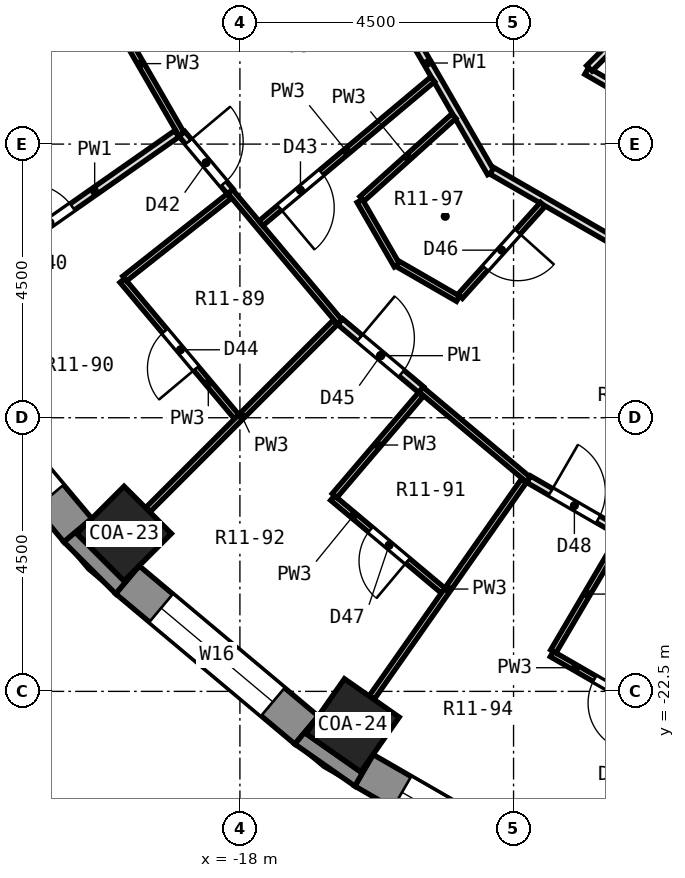
"""IFC4 building model, lengths in metres.
Left out: names, types, materials, properties, quantities, classifications, styles, units other than length and angle.
Written with IfcOpenShell. Run it as: python <this file> out.ifc"""

import sys

from ifc_helpers import new_model, si_unit, direction, frame, frame_2d, origin, origin_2d, place, context, subcontext, project, spatial, polyline, rectangle, outline, extrude, element, fill, save


model = new_model("IFC4")
c1 = context("Model", 3, precision=1e-05, world=origin(), true_north=direction((0.0, 1.0)))
c2 = subcontext(c1, "Body", "Model", "MODEL_VIEW")
j1 = project(units=[si_unit("LENGTHUNIT", "METRE"), si_unit("PLANEANGLEUNIT", "RADIAN")], contexts=[c1])
p1 = place(None, origin())
s1 = spatial("IfcSite", under=j1, at=p1, CompositionType="ELEMENT")
p2 = place(p1, origin())
s2 = spatial("IfcBuilding", under=s1, at=p2, CompositionType="ELEMENT")
p3 = place(p2, frame((0.0, 0.0, 46.1)))
s3 = spatial("IfcBuildingStorey", under=s2, at=p3, CompositionType="ELEMENT", Elevation=46.1)
for number, where, z_axis, x_axis in (
    (1, (-19.905, -19.905, 0.0), (0.0, 0.0, 1.0), (-0.707, -0.707, 0.0)),
    (2, (-16.146, -23.059, 0.0), (0.0, 0.0, 1.0), (-0.574, -0.819, 0.0)),
):
    element("IfcColumn", number, at=place(p3, frame(where, z_axis=z_axis, x_axis=x_axis)), inside=s3, PredefinedType="COLUMN", context=c2, shape_type="SweptSolid", body=[
        extrude(rectangle(XDim=1.1, YDim=1.1, at=origin_2d()), origin(), (0.0, 0.0, 1.0), 3.3),
    ])
p4 = place(p3, frame((-23.137, -16.904, 0.0), z_axis=(0.0, 0.0, 1.0), x_axis=(0.642809392687, -0.766026164483, 0.0)))
e3 = element("IfcWall", 3, at=p4, inside=s3, PredefinedType="SOLIDWALL", context=c2, shape_type="SweptSolid", body=[
    extrude(rectangle(XDim=3.846, YDim=0.6, at=frame_2d((1.923, 0.0))), origin(), (0.0, 0.0, 1.0), 2.75),
])
p5 = place(p4, frame((0.723, 0.0, 0.9)))
e4 = element("IfcOpeningElement", 4, at=p5, cuts=e3, PredefinedType="OPENING", context=c2, shape_type="SweptSolid", body=[
    extrude(rectangle(XDim=2.4, YDim=1.8, at=frame_2d((1.2, 0.9))), frame((0.0, 0.312, 0.0), z_axis=(0.0, -1.0, 0.0), x_axis=(1.0, 0.0, 0.0)), (0.0, 0.0, 1.0), 0.624),
])
p6 = place(p3, frame((-19.85, -20.665, 0.0), z_axis=(0.0, 0.0, 1.0), x_axis=(0.766026164483, -0.642809392687, 0.0)))
e5 = element("IfcWall", 5, at=p6, inside=s3, PredefinedType="SOLIDWALL", context=c2, shape_type="SweptSolid", body=[
    extrude(rectangle(XDim=3.846, YDim=0.6, at=frame_2d((1.923, 0.0))), origin(), (0.0, 0.0, 1.0), 2.75),
])
p7 = place(p6, frame((0.723, 0.0, 0.9)))
e6 = element("IfcOpeningElement", 6, at=p7, cuts=e5, PredefinedType="OPENING", context=c2, shape_type="SweptSolid", body=[
    extrude(rectangle(XDim=2.4, YDim=1.8, at=frame_2d((1.2, 0.9))), frame((0.0, 0.312, 0.0), z_axis=(0.0, -1.0, 0.0), x_axis=(1.0, 0.0, 0.0)), (0.0, 0.0, 1.0), 0.624),
])
p8 = place(p3, frame((-15.96, -23.798, 0.0), z_axis=(0.0, 0.0, 1.0), x_axis=(0.86603124159, -0.499989888488, 0.0)))
e7 = element("IfcWall", 7, at=p8, inside=s3, PredefinedType="SOLIDWALL", context=c2, shape_type="SweptSolid", body=[
    extrude(rectangle(XDim=3.846, YDim=0.6, at=frame_2d((1.923, 0.0))), origin(), (0.0, 0.0, 1.0), 2.75),
])
p9 = place(p8, frame((0.723, 0.0, 0.9)))
e8 = element("IfcOpeningElement", 8, at=p9, cuts=e7, PredefinedType="OPENING", context=c2, shape_type="SweptSolid", body=[
    extrude(rectangle(XDim=2.4, YDim=1.8, at=frame_2d((1.2, 0.9))), frame((0.0, 0.312, 0.0), z_axis=(0.0, -1.0, 0.0), x_axis=(1.0, 0.0, 0.0)), (0.0, 0.0, 1.0), 0.624),
])
p10 = place(p3, origin())
e9 = element("IfcWall", 9, at=p10, inside=s3, PredefinedType="SOLIDWALL", context=c2, shape_type="SweptSolid", body=[
    extrude(outline(polyline([(-20.043, -20.895), (-19.657, -20.435), (-19.905, -20.683), (-20.683, -19.905), (-20.435, -19.657), (-20.895, -20.043), (-20.043, -20.895)])), origin(), (0.0, 0.0, 1.0), 2.75),
])
p11 = place(p3, origin())
e10 = element("IfcWall", 10, at=p11, inside=s3, PredefinedType="SOLIDWALL", context=c2, shape_type="SweptSolid", body=[
    extrude(outline(polyline([(-17.097, -23.367), (-16.11, -24.058), (-15.81, -23.538), (-16.011, -23.825), (-16.912, -23.194), (-16.711, -22.907), (-17.097, -23.367)])), origin(), (0.0, 0.0, 1.0), 2.75),
])
p12 = place(p3, frame((-20.981, -9.838, 0.0), z_axis=(0.0, 0.0, 1.0), x_axis=(0.500011837539, -0.86601856927, 0.0)))
e11 = element("IfcWall", 11, at=p12, inside=s3, PredefinedType="PARTITIONING", context=c2, shape_type="SweptSolid", body=[
    extrude(rectangle(XDim=4.041, YDim=0.1, at=frame_2d((2.021, 0.0))), origin(), (0.0, 0.0, 1.0), 2.75),
])
p13 = place(p12, frame((1.521, 0.0, 0.0)))
e12 = element("IfcOpeningElement", 12, at=p13, cuts=e11, PredefinedType="OPENING", context=c2, shape_type="SweptSolid", body=[
    extrude(rectangle(XDim=0.9, YDim=2.1, at=frame_2d((0.45, 1.05))), frame((0.0, 0.062, 0.0), z_axis=(0.0, -1.0, 0.0), x_axis=(1.0, 0.0, 0.0)), (0.0, 0.0, 1.0), 0.124),
])
p14 = place(p3, frame((-16.03, -14.434, 0.0), z_axis=(0.0, 0.0, 1.0), x_axis=(0.499779910804, -0.866152435058, 0.0)))
e13 = element("IfcWall", 13, at=p14, inside=s3, PredefinedType="PARTITIONING", context=c2, shape_type="SweptSolid", body=[
    extrude(rectangle(XDim=1.226, YDim=0.1, at=frame_2d((0.613, 0.0))), origin(), (0.0, 0.0, 1.0), 2.75),
])
p15 = place(p3, frame((-15.957, -10.362, 0.0), z_axis=(0.0, 0.0, 1.0), x_axis=(0.500063859158, -0.865988531543, 0.0)))
e14 = element("IfcWall", 14, at=p15, inside=s3, PredefinedType="PARTITIONING", context=c2, shape_type="SweptSolid", body=[
    extrude(rectangle(XDim=4.168, YDim=0.125, at=frame_2d((2.084, 0.0))), origin(), (0.0, 0.0, 1.0), 2.75),
])
p16 = place(p15, frame((0.674, 0.0, 0.0)))
e15 = element("IfcOpeningElement", 15, at=p16, cuts=e14, PredefinedType="OPENING", context=c2, shape_type="SweptSolid", body=[
    extrude(rectangle(XDim=1.0, YDim=2.1, at=frame_2d((0.5, 1.05))), frame((0.0, 0.074, 0.0), z_axis=(0.0, -1.0, 0.0), x_axis=(1.0, 0.0, 0.0)), (0.0, 0.0, 1.0), 0.149),
])
p17 = place(p3, frame((-19.934, -15.743, 0.0), z_axis=(0.0, 0.0, 1.0), x_axis=(0.642726064959, -0.766096081064, 0.0)))
e16 = element("IfcWall", 16, at=p17, inside=s3, PredefinedType="PARTITIONING", context=c2, shape_type="SweptSolid", body=[
    extrude(rectangle(XDim=2.925, YDim=0.1, at=frame_2d((1.462, 0.0))), origin(), (0.0, 0.0, 1.0), 2.75),
])
p18 = place(p17, frame((1.087, 0.0, 0.0)))
e17 = element("IfcOpeningElement", 17, at=p18, cuts=e16, PredefinedType="OPENING", context=c2, shape_type="SweptSolid", body=[
    extrude(rectangle(XDim=0.8, YDim=2.1, at=frame_2d((0.4, 1.05))), frame((0.0, 0.062, 0.0), z_axis=(0.0, -1.0, 0.0), x_axis=(1.0, 0.0, 0.0)), (0.0, 0.0, 1.0), 0.124),
])
p19 = place(p3, frame((-18.16, -14.279, 0.0), z_axis=(0.0, 0.0, 1.0), x_axis=(0.642859397188, -0.765984200521, 0.0)))
e18 = element("IfcWall", 18, at=p19, inside=s3, PredefinedType="PARTITIONING", context=c2, shape_type="SweptSolid", body=[
    extrude(rectangle(XDim=2.806, YDim=0.1, at=frame_2d((1.403, 0.0))), origin(), (0.0, 0.0, 1.0), 2.75),
])
p20 = place(p3, frame((-18.954, -13.332, 0.0), z_axis=(0.0, 0.0, 1.0), x_axis=(0.642533660644, -0.766257459956, 0.0)))
e19 = element("IfcWall", 19, at=p20, inside=s3, PredefinedType="PARTITIONING", context=c2, shape_type="SweptSolid", body=[
    extrude(rectangle(XDim=1.235, YDim=0.125, at=frame_2d((0.618, 0.0))), origin(), (0.0, 0.0, 1.0), 2.75),
])
p21 = place(p20, frame((0.167, 0.0, 0.0)))
e20 = element("IfcOpeningElement", 20, at=p21, cuts=e19, PredefinedType="OPENING", context=c2, shape_type="SweptSolid", body=[
    extrude(rectangle(XDim=0.9, YDim=2.1, at=frame_2d((0.45, 1.05))), frame((0.0, 0.074, 0.0), z_axis=(0.0, -1.0, 0.0), x_axis=(1.0, 0.0, 0.0)), (0.0, 0.0, 1.0), 0.149),
])
p22 = place(p3, frame((-16.476, -19.319, 0.0), z_axis=(0.0, 0.0, 1.0), x_axis=(0.766109873163, -0.642709625136, 0.0)))
e21 = element("IfcWall", 21, at=p22, inside=s3, PredefinedType="PARTITIONING", context=c2, shape_type="SweptSolid", body=[
    extrude(rectangle(XDim=2.374, YDim=0.1, at=frame_2d((1.187, 0.0))), origin(), (0.0, 0.0, 1.0), 2.75),
])
p23 = place(p22, frame((0.812, 0.0, 0.0)))
e22 = element("IfcOpeningElement", 22, at=p23, cuts=e21, PredefinedType="OPENING", context=c2, shape_type="SweptSolid", body=[
    extrude(rectangle(XDim=0.8, YDim=2.1, at=frame_2d((0.4, 1.05))), frame((0.0, 0.062, 0.0), z_axis=(0.0, -1.0, 0.0), x_axis=(1.0, 0.0, 0.0)), (0.0, 0.0, 1.0), 0.124),
])
p24 = place(p3, frame((-15.021, -17.537, 0.0), z_axis=(0.0, 0.0, 1.0), x_axis=(0.766099024104, -0.642722556993, 0.0)))
e23 = element("IfcWall", 23, at=p24, inside=s3, PredefinedType="PARTITIONING", context=c2, shape_type="SweptSolid", body=[
    extrude(rectangle(XDim=2.305, YDim=0.1, at=frame_2d((1.153, 0.0))), origin(), (0.0, 0.0, 1.0), 2.75),
])
p25 = place(p3, frame((-16.351, -16.421, 0.0), z_axis=(0.0, 0.0, 1.0), x_axis=(0.765968068891, -0.642878617967, 0.0)))
e24 = element("IfcWall", 24, at=p25, inside=s3, PredefinedType="PARTITIONING", context=c2, shape_type="SweptSolid", body=[
    extrude(rectangle(XDim=1.736, YDim=0.125, at=frame_2d((0.868, 0.0))), origin(), (0.0, 0.0, 1.0), 2.75),
])
p26 = place(p25, frame((0.418, 0.0, 0.0)))
e25 = element("IfcOpeningElement", 25, at=p26, cuts=e24, PredefinedType="OPENING", context=c2, shape_type="SweptSolid", body=[
    extrude(rectangle(XDim=0.9, YDim=2.1, at=frame_2d((0.45, 1.05))), frame((0.0, 0.074, 0.0), z_axis=(0.0, -1.0, 0.0), x_axis=(1.0, 0.0, 0.0)), (0.0, 0.0, 1.0), 0.149),
])
p27 = place(p3, frame((-12.871, -21.886, 0.0), z_axis=(0.0, 0.0, 1.0), x_axis=(0.865944213836, -0.500140598757, 0.0)))
e26 = element("IfcWall", 26, at=p27, inside=s3, PredefinedType="PARTITIONING", context=c2, shape_type="SweptSolid", body=[
    extrude(rectangle(XDim=2.375, YDim=0.1, at=frame_2d((1.188, 0.0))), origin(), (0.0, 0.0, 1.0), 2.75),
])
p28 = place(p27, frame((0.812, 0.0, 0.0)))
e27 = element("IfcOpeningElement", 27, at=p28, cuts=e26, PredefinedType="OPENING", context=c2, shape_type="SweptSolid", body=[
    extrude(rectangle(XDim=0.8, YDim=2.1, at=frame_2d((0.4, 1.05))), frame((0.0, 0.062, 0.0), z_axis=(0.0, -1.0, 0.0), x_axis=(1.0, 0.0, 0.0)), (0.0, 0.0, 1.0), 0.124),
])
p29 = place(p3, frame((-13.251, -19.011, 0.0), z_axis=(0.0, 0.0, 1.0), x_axis=(0.865854192141, -0.500296430081, 0.0)))
e28 = element("IfcWall", 28, at=p29, inside=s3, PredefinedType="PARTITIONING", context=c2, shape_type="SweptSolid", body=[
    extrude(rectangle(XDim=2.16, YDim=0.125, at=frame_2d((1.08, 0.0))), origin(), (0.0, 0.0, 1.0), 2.75),
])
p30 = place(p29, frame((0.417, 0.0, 0.0)))
e29 = element("IfcOpeningElement", 29, at=p30, cuts=e28, PredefinedType="OPENING", context=c2, shape_type="SweptSolid", body=[
    extrude(rectangle(XDim=0.9, YDim=2.1, at=frame_2d((0.45, 1.05))), frame((0.0, 0.074, 0.0), z_axis=(0.0, -1.0, 0.0), x_axis=(1.0, 0.0, 0.0)), (0.0, 0.0, 1.0), 0.149),
])
p31 = place(p3, frame((-15.403, -15.471, 0.0), z_axis=(0.0, 0.0, 1.0), x_axis=(0.866117982198, -0.499839615189, 0.0)))
e30 = element("IfcWall", 30, at=p31, inside=s3, PredefinedType="PARTITIONING", context=c2, shape_type="SweptSolid", body=[
    extrude(rectangle(XDim=1.143, YDim=0.1, at=frame_2d((0.571, 0.0))), origin(), (0.0, 0.0, 1.0), 2.75),
])
p32 = place(p3, frame((-13.855, -13.94, 0.0), z_axis=(0.0, 0.0, 1.0), x_axis=(0.866024825845, -0.50000100102, 0.0)))
e31 = element("IfcWall", 31, at=p32, inside=s3, PredefinedType="PARTITIONING", context=c2, shape_type="SweptSolid", body=[
    extrude(rectangle(XDim=10.192, YDim=0.125, at=frame_2d((5.096, 0.0))), origin(), (0.0, 0.0, 1.0), 2.75),
])
p33 = place(p3, frame((-12.298, -12.298, 0.0), z_axis=(0.0, 0.0, 1.0), x_axis=(0.865982621983, -0.500074092933, 0.0)))
e32 = element("IfcWall", 32, at=p33, inside=s3, PredefinedType="PARTITIONING", context=c2, shape_type="SweptSolid", body=[
    extrude(rectangle(XDim=9.075, YDim=0.125, at=frame_2d((4.537, 0.0))), origin(), (0.0, 0.0, 1.0), 2.75),
])
p34 = place(p33, frame((3.281, 0.0, 0.0)))
e33 = element("IfcOpeningElement", 33, at=p34, cuts=e32, PredefinedType="OPENING", context=c2, shape_type="SweptSolid", body=[
    extrude(rectangle(XDim=0.9, YDim=2.1, at=frame_2d((0.45, 1.05))), frame((0.0, 0.074, 0.0), z_axis=(0.0, -1.0, 0.0), x_axis=(1.0, 0.0, 0.0)), (0.0, 0.0, 1.0), 0.149),
])
p35 = place(p3, frame((-22.601, -15.825, 0.0), z_axis=(0.0, 0.0, 1.0), x_axis=(0.819158088694, 0.57356780395, 0.0)))
e34 = element("IfcWall", 34, at=p35, inside=s3, PredefinedType="PARTITIONING", context=c2, shape_type="SweptSolid", body=[
    extrude(rectangle(XDim=4.35, YDim=0.125, at=frame_2d((2.175, 0.0))), origin(), (0.0, 0.0, 1.0), 2.75),
])
p36 = place(p35, frame((1.353, 0.0, 0.0)))
e35 = element("IfcOpeningElement", 35, at=p36, cuts=e34, PredefinedType="OPENING", context=c2, shape_type="SweptSolid", body=[
    extrude(rectangle(XDim=0.9, YDim=2.1, at=frame_2d((0.45, 1.05))), frame((0.0, 0.074, 0.0), z_axis=(0.0, -1.0, 0.0), x_axis=(1.0, 0.0, 0.0)), (0.0, 0.0, 1.0), 0.149),
])
p37 = place(p3, frame((-19.895, -15.712, 0.0), z_axis=(0.0, 0.0, 1.0), x_axis=(0.784868488399, 0.619662372521, 0.0)))
e36 = element("IfcWall", 36, at=p37, inside=s3, PredefinedType="PARTITIONING", context=c2, shape_type="SweptSolid", body=[
    extrude(rectangle(XDim=2.189, YDim=0.1, at=frame_2d((1.094, 0.0))), origin(), (0.0, 0.0, 1.0), 2.75),
])
p38 = place(p3, frame((-17.655, -14.803, 0.0), z_axis=(0.0, 0.0, 1.0), x_axis=(0.766273613589, 0.642514396039, 0.0)))
e37 = element("IfcWall", 37, at=p38, inside=s3, PredefinedType="PARTITIONING", context=c2, shape_type="SweptSolid", body=[
    extrude(rectangle(XDim=3.685, YDim=0.1, at=frame_2d((1.843, 0.0))), origin(), (0.0, 0.0, 1.0), 2.75),
])
p39 = place(p38, frame((0.399, 0.0, 0.0)))
e38 = element("IfcOpeningElement", 38, at=p39, cuts=e37, PredefinedType="OPENING", context=c2, shape_type="SweptSolid", body=[
    extrude(rectangle(XDim=0.9, YDim=2.1, at=frame_2d((0.45, 1.05))), frame((0.0, 0.062, 0.0), z_axis=(0.0, -1.0, 0.0), x_axis=(1.0, 0.0, 0.0)), (0.0, 0.0, 1.0), 0.124),
])
p40 = place(p3, frame((-15.993, -14.401, 0.0), z_axis=(0.0, 0.0, 1.0), x_axis=(0.74316878737, 0.669103993022, 0.0)))
e39 = element("IfcWall", 39, at=p40, inside=s3, PredefinedType="PARTITIONING", context=c2, shape_type="SweptSolid", body=[
    extrude(rectangle(XDim=2.034, YDim=0.1, at=frame_2d((1.017, 0.0))), origin(), (0.0, 0.0, 1.0), 2.75),
])
p41 = place(p3, frame((-19.509, -19.509, 0.0), z_axis=(0.0, 0.0, 1.0), x_axis=(0.707106781187, 0.707106781187, 0.0)))
e40 = element("IfcWall", 40, at=p41, inside=s3, PredefinedType="PARTITIONING", context=c2, shape_type="SweptSolid", body=[
    extrude(rectangle(XDim=4.35, YDim=0.1, at=frame_2d((2.175, 0.0))), origin(), (0.0, 0.0, 1.0), 2.75),
])
p42 = place(p3, frame((-12.254, -12.254, 0.0), z_axis=(0.0, 0.0, 1.0), x_axis=(0.707106781187, 0.707106781187, 0.0)))
e41 = element("IfcWall", 41, at=p42, inside=s3, PredefinedType="PARTITIONING", context=c2, shape_type="SweptSolid", body=[
    extrude(rectangle(XDim=7.738, YDim=0.125, at=frame_2d((3.869, 0.0))), origin(), (0.0, 0.0, 1.0), 2.75),
])
p43 = place(p3, frame((-14.38, -16.005, 0.0), z_axis=(0.0, 0.0, 1.0), x_axis=(0.668334266264, 0.743861081478, 0.0)))
e42 = element("IfcWall", 42, at=p43, inside=s3, PredefinedType="PARTITIONING", context=c2, shape_type="SweptSolid", body=[
    extrude(rectangle(XDim=2.033, YDim=0.1, at=frame_2d((1.017, 0.0))), origin(), (0.0, 0.0, 1.0), 2.75),
])
p44 = place(p43, frame((0.623, 0.0, 0.0)))
e43 = element("IfcOpeningElement", 43, at=p44, cuts=e42, PredefinedType="OPENING", context=c2, shape_type="SweptSolid", body=[
    extrude(rectangle(XDim=0.8, YDim=2.1, at=frame_2d((0.4, 1.05))), frame((0.0, 0.062, 0.0), z_axis=(0.0, -1.0, 0.0), x_axis=(1.0, 0.0, 0.0)), (0.0, 0.0, 1.0), 0.124),
])
p45 = place(p3, frame((-16.444, -19.281, 0.0), z_axis=(0.0, 0.0, 1.0), x_axis=(0.648988401233, 0.760798301171, 0.0)))
e44 = element("IfcWall", 44, at=p45, inside=s3, PredefinedType="PARTITIONING", context=c2, shape_type="SweptSolid", body=[
    extrude(rectangle(XDim=2.188, YDim=0.1, at=frame_2d((1.094, 0.0))), origin(), (0.0, 0.0, 1.0), 2.75),
])
p46 = place(p3, frame((-15.829, -22.597, 0.0), z_axis=(0.0, 0.0, 1.0), x_axis=(0.574588030597, 0.818442786696, 0.0)))
e45 = element("IfcWall", 45, at=p46, inside=s3, PredefinedType="PARTITIONING", context=c2, shape_type="SweptSolid", body=[
    extrude(rectangle(XDim=4.35, YDim=0.1, at=frame_2d((2.175, 0.0))), origin(), (0.0, 0.0, 1.0), 2.75),
])
p47 = place(p3, frame((-12.846, -21.843, 0.0), z_axis=(0.0, 0.0, 1.0), x_axis=(0.507073781844, 0.86190265098, 0.0)))
e46 = element("IfcWall", 46, at=p47, inside=s3, PredefinedType="PARTITIONING", context=c2, shape_type="SweptSolid", body=[
    extrude(rectangle(XDim=2.187, YDim=0.1, at=frame_2d((1.094, 0.0))), origin(), (0.0, 0.0, 1.0), 2.75),
])
p48 = place(p5, origin())
e47 = element("IfcWindow", 47, at=p48, inside=s3, PartitioningType="SINGLE_PANEL", PredefinedType="WINDOW", context=c2, shape_type="SweptSolid", body=[
    extrude(rectangle(XDim=2.4, YDim=1.8, at=frame_2d((1.2, 0.9))), frame((0.0, 0.18, 0.0), z_axis=(0.0, -1.0, 0.0), x_axis=(1.0, 0.0, 0.0)), (0.0, 0.0, 1.0), 0.06),
])
fill(e4, e47)
p49 = place(p7, origin())
e48 = element("IfcWindow", 48, at=p49, inside=s3, PartitioningType="SINGLE_PANEL", PredefinedType="WINDOW", context=c2, shape_type="SweptSolid", body=[
    extrude(rectangle(XDim=2.4, YDim=1.8, at=frame_2d((1.2, 0.9))), frame((0.0, 0.18, 0.0), z_axis=(0.0, -1.0, 0.0), x_axis=(1.0, 0.0, 0.0)), (0.0, 0.0, 1.0), 0.06),
])
fill(e6, e48)
p50 = place(p9, origin())
e49 = element("IfcWindow", 49, at=p50, inside=s3, PartitioningType="SINGLE_PANEL", PredefinedType="WINDOW", context=c2, shape_type="SweptSolid", body=[
    extrude(rectangle(XDim=2.4, YDim=1.8, at=frame_2d((1.2, 0.9))), frame((0.0, 0.18, 0.0), z_axis=(0.0, -1.0, 0.0), x_axis=(1.0, 0.0, 0.0)), (0.0, 0.0, 1.0), 0.06),
])
fill(e8, e49)
p51 = place(p36, origin())
e50 = element("IfcDoor", 50, at=p51, inside=s3, OperationType="SINGLE_SWING_LEFT", PredefinedType="DOOR", context=c2, shape_type="SweptSolid", body=[
    extrude(rectangle(XDim=0.9, YDim=2.1, at=frame_2d((0.45, 1.05))), frame((0.0, 0.025, 0.0), z_axis=(0.0, -1.0, 0.0), x_axis=(1.0, 0.0, 0.0)), (0.0, 0.0, 1.0), 0.05),
])
fill(e35, e50)
p52 = place(p21, origin())
e51 = element("IfcDoor", 51, at=p52, inside=s3, OperationType="SINGLE_SWING_LEFT", PredefinedType="DOOR", context=c2, shape_type="SweptSolid", body=[
    extrude(rectangle(XDim=0.9, YDim=2.1, at=frame_2d((0.45, 1.05))), frame((0.0, 0.025, 0.0), z_axis=(0.0, -1.0, 0.0), x_axis=(1.0, 0.0, 0.0)), (0.0, 0.0, 1.0), 0.05),
])
fill(e20, e51)
p53 = place(p39, frame((0.9, 0.0, 0.0), z_axis=(0.0, 0.0, 1.0), x_axis=(-1.0, 0.0, 0.0)))
e52 = element("IfcDoor", 52, at=p53, inside=s3, OperationType="SINGLE_SWING_RIGHT", PredefinedType="DOOR", context=c2, shape_type="SweptSolid", body=[
    extrude(rectangle(XDim=0.9, YDim=2.1, at=frame_2d((0.45, 1.05))), frame((0.0, 0.025, 0.0), z_axis=(0.0, -1.0, 0.0), x_axis=(1.0, 0.0, 0.0)), (0.0, 0.0, 1.0), 0.05),
])
fill(e38, e52)
p54 = place(p18, frame((0.8, 0.0, 0.0), z_axis=(0.0, 0.0, 1.0), x_axis=(-1.0, 0.0, 0.0)))
e53 = element("IfcDoor", 53, at=p54, inside=s3, OperationType="SINGLE_SWING_LEFT", PredefinedType="DOOR", context=c2, shape_type="SweptSolid", body=[
    extrude(rectangle(XDim=0.8, YDim=2.1, at=frame_2d((0.4, 1.05))), frame((0.0, 0.025, 0.0), z_axis=(0.0, -1.0, 0.0), x_axis=(1.0, 0.0, 0.0)), (0.0, 0.0, 1.0), 0.05),
])
fill(e17, e53)
p55 = place(p26, origin())
e54 = element("IfcDoor", 54, at=p55, inside=s3, OperationType="SINGLE_SWING_LEFT", PredefinedType="DOOR", context=c2, shape_type="SweptSolid", body=[
    extrude(rectangle(XDim=0.9, YDim=2.1, at=frame_2d((0.45, 1.05))), frame((0.0, 0.025, 0.0), z_axis=(0.0, -1.0, 0.0), x_axis=(1.0, 0.0, 0.0)), (0.0, 0.0, 1.0), 0.05),
])
fill(e25, e54)
p56 = place(p44, frame((0.8, 0.0, 0.0), z_axis=(0.0, 0.0, 1.0), x_axis=(-1.0, 0.0, 0.0)))
e55 = element("IfcDoor", 55, at=p56, inside=s3, OperationType="SINGLE_SWING_LEFT", PredefinedType="DOOR", context=c2, shape_type="SweptSolid", body=[
    extrude(rectangle(XDim=0.8, YDim=2.1, at=frame_2d((0.4, 1.05))), frame((0.0, 0.025, 0.0), z_axis=(0.0, -1.0, 0.0), x_axis=(1.0, 0.0, 0.0)), (0.0, 0.0, 1.0), 0.05),
])
fill(e43, e55)
p57 = place(p23, frame((0.8, 0.0, 0.0), z_axis=(0.0, 0.0, 1.0), x_axis=(-1.0, 0.0, 0.0)))
e56 = element("IfcDoor", 56, at=p57, inside=s3, OperationType="SINGLE_SWING_LEFT", PredefinedType="DOOR", context=c2, shape_type="SweptSolid", body=[
    extrude(rectangle(XDim=0.8, YDim=2.1, at=frame_2d((0.4, 1.05))), frame((0.0, 0.025, 0.0), z_axis=(0.0, -1.0, 0.0), x_axis=(1.0, 0.0, 0.0)), (0.0, 0.0, 1.0), 0.05),
])
fill(e22, e56)
p58 = place(p30, origin())
e57 = element("IfcDoor", 57, at=p58, inside=s3, OperationType="SINGLE_SWING_LEFT", PredefinedType="DOOR", context=c2, shape_type="SweptSolid", body=[
    extrude(rectangle(XDim=0.9, YDim=2.1, at=frame_2d((0.45, 1.05))), frame((0.0, 0.025, 0.0), z_axis=(0.0, -1.0, 0.0), x_axis=(1.0, 0.0, 0.0)), (0.0, 0.0, 1.0), 0.05),
])
fill(e29, e57)
p59 = place(p28, frame((0.8, 0.0, 0.0), z_axis=(0.0, 0.0, 1.0), x_axis=(-1.0, 0.0, 0.0)))
e58 = element("IfcDoor", 58, at=p59, inside=s3, OperationType="SINGLE_SWING_LEFT", PredefinedType="DOOR", context=c2, shape_type="SweptSolid", body=[
    extrude(rectangle(XDim=0.8, YDim=2.1, at=frame_2d((0.4, 1.05))), frame((0.0, 0.025, 0.0), z_axis=(0.0, -1.0, 0.0), x_axis=(1.0, 0.0, 0.0)), (0.0, 0.0, 1.0), 0.05),
])
fill(e27, e58)
save(model, sys.argv[1])
